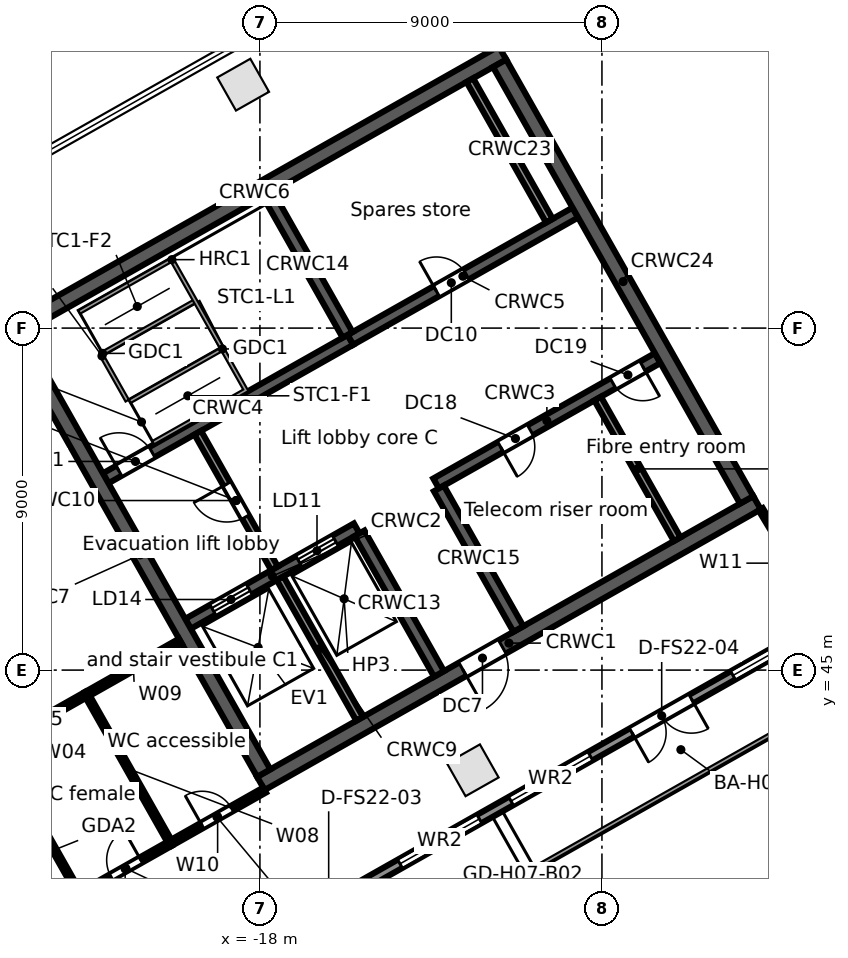
"""IFC4 building model, lengths in metres.
Left out: names, types, materials, properties, quantities, classifications, styles, units other than length and angle.
Written with IfcOpenShell. Run it as: python <this file> out.ifc"""

import sys

from ifc_helpers import new_model, si_unit, direction, frame, frame_2d, origin, origin_2d, place, context, subcontext, project, spatial, rectangle, extrude, element, fill, save


model = new_model("IFC4")
c1 = context("Model", 3, precision=1e-05, world=origin(), true_north=direction((0.0, 1.0)))
c2 = subcontext(c1, "Body", "Model", "MODEL_VIEW")
j1 = project(units=[si_unit("LENGTHUNIT", "METRE"), si_unit("PLANEANGLEUNIT", "RADIAN")], contexts=[c1])
p1 = place(None, origin())
s1 = spatial("IfcSite", under=j1, at=p1, CompositionType="ELEMENT")
p2 = place(p1, origin())
s2 = spatial("IfcBuilding", under=s1, at=p2, CompositionType="ELEMENT")
p3 = place(p2, frame((0.0, 0.0, 331.7)))
s3 = spatial("IfcBuildingStorey", under=s2, at=p3, CompositionType="ELEMENT", Elevation=331.7)
for number, where, z_axis, x_axis in (
    (1, (-18.441, 60.406, 0.0), (0.0, 0.0, 1.0), (-0.87, -0.492, 0.0)),
    (2, (-12.4, 42.363, 0.0), (0.0, 0.0, 1.0), (0.87, 0.492, 0.0)),
):
    element("IfcColumn", number, at=place(p3, frame(where, z_axis=z_axis, x_axis=x_axis)), inside=s3, PredefinedType="COLUMN", context=c2, shape_type="SweptSolid", body=[
        extrude(rectangle(XDim=1.0, YDim=1.0, at=origin_2d()), origin(), (0.0, 0.0, 1.0), 3.8),
    ])
p4 = place(p3, frame((-3.017, 46.293, 0.0), z_axis=(0.0, 0.0, 1.0), x_axis=(-0.870355474887, -0.492423950812, 0.0)))
e3 = element("IfcWall", 3, at=p4, inside=s3, PredefinedType="STANDARD", context=c2, shape_type="SweptSolid", body=[
    extrude(rectangle(XDim=40.34, YDim=0.25, at=frame_2d((20.17, 0.0))), origin(), (0.0, 0.0, 1.0), 3.52),
])
p5 = place(p4, frame((37.428, 0.0, 0.8)))
e4 = element("IfcOpeningElement", 4, at=p5, cuts=e3, PredefinedType="OPENING", context=c2, shape_type="SweptSolid", body=[
    extrude(rectangle(XDim=2.4, YDim=2.2, at=frame_2d((1.2, 1.1))), frame((0.0, 0.135, 0.0), z_axis=(0.0, -1.0, 0.0), x_axis=(1.0, 0.0, 0.0)), (0.0, 0.0, 1.0), 0.27),
])
p6 = place(p4, frame((34.372, 0.0, 0.0)))
e5 = element("IfcOpeningElement", 5, at=p6, cuts=e3, PredefinedType="OPENING", context=c2, shape_type="SweptSolid", body=[
    extrude(rectangle(XDim=1.8, YDim=2.4, at=frame_2d((0.9, 1.2))), frame((0.0, 0.135, 0.0), z_axis=(0.0, -1.0, 0.0), x_axis=(1.0, 0.0, 0.0)), (0.0, 0.0, 1.0), 0.27),
])
p7 = place(p4, frame((30.716, 0.0, 0.8)))
e6 = element("IfcOpeningElement", 6, at=p7, cuts=e3, PredefinedType="OPENING", context=c2, shape_type="SweptSolid", body=[
    extrude(rectangle(XDim=2.4, YDim=2.2, at=frame_2d((1.2, 1.1))), frame((0.0, 0.135, 0.0), z_axis=(0.0, -1.0, 0.0), x_axis=(1.0, 0.0, 0.0)), (0.0, 0.0, 1.0), 0.27),
])
p8 = place(p4, frame((27.36, 0.0, 0.8)))
e7 = element("IfcOpeningElement", 7, at=p8, cuts=e3, PredefinedType="OPENING", context=c2, shape_type="SweptSolid", body=[
    extrude(rectangle(XDim=2.4, YDim=2.2, at=frame_2d((1.2, 1.1))), frame((0.0, 0.135, 0.0), z_axis=(0.0, -1.0, 0.0), x_axis=(1.0, 0.0, 0.0)), (0.0, 0.0, 1.0), 0.27),
])
p9 = place(p4, frame((24.304, 0.0, 0.0)))
e8 = element("IfcOpeningElement", 8, at=p9, cuts=e3, PredefinedType="OPENING", context=c2, shape_type="SweptSolid", body=[
    extrude(rectangle(XDim=1.8, YDim=2.4, at=frame_2d((0.9, 1.2))), frame((0.0, 0.135, 0.0), z_axis=(0.0, -1.0, 0.0), x_axis=(1.0, 0.0, 0.0)), (0.0, 0.0, 1.0), 0.27),
])
p10 = place(p4, frame((20.648, 0.0, 0.8)))
e9 = element("IfcOpeningElement", 9, at=p10, cuts=e3, PredefinedType="OPENING", context=c2, shape_type="SweptSolid", body=[
    extrude(rectangle(XDim=2.4, YDim=2.2, at=frame_2d((1.2, 1.1))), frame((0.0, 0.135, 0.0), z_axis=(0.0, -1.0, 0.0), x_axis=(1.0, 0.0, 0.0)), (0.0, 0.0, 1.0), 0.27),
])
p11 = place(p4, frame((17.292, 0.0, 0.8)))
e10 = element("IfcOpeningElement", 10, at=p11, cuts=e3, PredefinedType="OPENING", context=c2, shape_type="SweptSolid", body=[
    extrude(rectangle(XDim=2.4, YDim=2.2, at=frame_2d((1.2, 1.1))), frame((0.0, 0.135, 0.0), z_axis=(0.0, -1.0, 0.0), x_axis=(1.0, 0.0, 0.0)), (0.0, 0.0, 1.0), 0.27),
])
p12 = place(p4, frame((14.236, 0.0, 0.0)))
e11 = element("IfcOpeningElement", 11, at=p12, cuts=e3, PredefinedType="OPENING", context=c2, shape_type="SweptSolid", body=[
    extrude(rectangle(XDim=1.8, YDim=2.4, at=frame_2d((0.9, 1.2))), frame((0.0, 0.135, 0.0), z_axis=(0.0, -1.0, 0.0), x_axis=(1.0, 0.0, 0.0)), (0.0, 0.0, 1.0), 0.27),
])
p13 = place(p4, frame((10.58, 0.0, 0.8)))
e12 = element("IfcOpeningElement", 12, at=p13, cuts=e3, PredefinedType="OPENING", context=c2, shape_type="SweptSolid", body=[
    extrude(rectangle(XDim=2.4, YDim=2.2, at=frame_2d((1.2, 1.1))), frame((0.0, 0.135, 0.0), z_axis=(0.0, -1.0, 0.0), x_axis=(1.0, 0.0, 0.0)), (0.0, 0.0, 1.0), 0.27),
])
p14 = place(p4, frame((7.224, 0.0, 0.8)))
e13 = element("IfcOpeningElement", 13, at=p14, cuts=e3, PredefinedType="OPENING", context=c2, shape_type="SweptSolid", body=[
    extrude(rectangle(XDim=2.4, YDim=2.2, at=frame_2d((1.2, 1.1))), frame((0.0, 0.135, 0.0), z_axis=(0.0, -1.0, 0.0), x_axis=(1.0, 0.0, 0.0)), (0.0, 0.0, 1.0), 0.27),
])
p15 = place(p4, frame((4.168, 0.0, 0.0)))
e14 = element("IfcOpeningElement", 14, at=p15, cuts=e3, PredefinedType="OPENING", context=c2, shape_type="SweptSolid", body=[
    extrude(rectangle(XDim=1.8, YDim=2.4, at=frame_2d((0.9, 1.2))), frame((0.0, 0.135, 0.0), z_axis=(0.0, -1.0, 0.0), x_axis=(1.0, 0.0, 0.0)), (0.0, 0.0, 1.0), 0.27),
])
p16 = place(p4, frame((0.512, 0.0, 0.8)))
e15 = element("IfcOpeningElement", 15, at=p16, cuts=e3, PredefinedType="OPENING", context=c2, shape_type="SweptSolid", body=[
    extrude(rectangle(XDim=2.4, YDim=2.2, at=frame_2d((1.2, 1.1))), frame((0.0, 0.135, 0.0), z_axis=(0.0, -1.0, 0.0), x_axis=(1.0, 0.0, 0.0)), (0.0, 0.0, 1.0), 0.27),
])
p17 = place(p3, frame((-17.975, 42.017, 0.0), z_axis=(0.0, 0.0, 1.0), x_axis=(0.87034965173, 0.492434243055, 0.0)))
e16 = element("IfcWall", 16, at=p17, inside=s3, PredefinedType="SOLIDWALL", context=c2, shape_type="SweptSolid", body=[
    extrude(rectangle(XDim=15.0, YDim=0.4, at=frame_2d((7.5, 0.0))), origin(), (0.0, 0.0, 1.0), 3.52),
])
p18 = place(p17, frame((6.1, 0.0, 0.0)))
e17 = element("IfcOpeningElement", 17, at=p18, cuts=e16, PredefinedType="OPENING", context=c2, shape_type="SweptSolid", body=[
    extrude(rectangle(XDim=1.2, YDim=2.1, at=frame_2d((0.6, 1.05))), frame((0.0, 0.21, 0.0), z_axis=(0.0, -1.0, 0.0), x_axis=(1.0, 0.0, 0.0)), (0.0, 0.0, 1.0), 0.42),
])
p19 = place(p3, frame((-19.892, 46.218, 0.0), z_axis=(0.0, 0.0, 1.0), x_axis=(0.870341639186, 0.492448404505, 0.0)))
e18 = element("IfcWall", 18, at=p19, inside=s3, PredefinedType="SOLIDWALL", context=c2, shape_type="SweptSolid", body=[
    extrude(rectangle(XDim=5.1, YDim=0.3, at=frame_2d((2.55, 0.0))), origin(), (0.0, 0.0, 1.0), 3.52),
])
p20 = place(p19, frame((0.75, 0.0, 0.0)))
e19 = element("IfcOpeningElement", 19, at=p20, cuts=e18, PredefinedType="OPENING", context=c2, shape_type="SweptSolid", body=[
    extrude(rectangle(XDim=1.1, YDim=2.1, at=frame_2d((0.55, 1.05))), frame((0.0, 0.16, 0.0), z_axis=(0.0, -1.0, 0.0), x_axis=(1.0, 0.0, 0.0)), (0.0, 0.0, 1.0), 0.32),
])
p21 = place(p19, frame((3.35, 0.0, 0.0)))
e20 = element("IfcOpeningElement", 20, at=p21, cuts=e18, PredefinedType="OPENING", context=c2, shape_type="SweptSolid", body=[
    extrude(rectangle(XDim=1.1, YDim=2.1, at=frame_2d((0.55, 1.05))), frame((0.0, 0.16, 0.0), z_axis=(0.0, -1.0, 0.0), x_axis=(1.0, 0.0, 0.0)), (0.0, 0.0, 1.0), 0.32),
])
p22 = place(p3, frame((-13.365, 49.911, 0.0), z_axis=(0.0, 0.0, 1.0), x_axis=(0.870347618718, 0.492437836272, 0.0)))
e21 = element("IfcWall", 21, at=p22, inside=s3, PredefinedType="SOLIDWALL", context=c2, shape_type="SweptSolid", body=[
    extrude(rectangle(XDim=6.7, YDim=0.3, at=frame_2d((3.35, 0.0))), origin(), (0.0, 0.0, 1.0), 3.52),
])
p23 = place(p22, frame((1.95, 0.0, 0.0)))
e22 = element("IfcOpeningElement", 22, at=p23, cuts=e21, PredefinedType="OPENING", context=c2, shape_type="SweptSolid", body=[
    extrude(rectangle(XDim=0.9, YDim=2.1, at=frame_2d((0.45, 1.05))), frame((0.0, 0.16, 0.0), z_axis=(0.0, -1.0, 0.0), x_axis=(1.0, 0.0, 0.0)), (0.0, 0.0, 1.0), 0.32),
])
p24 = place(p22, frame((5.35, 0.0, 0.0)))
e23 = element("IfcOpeningElement", 23, at=p24, cuts=e21, PredefinedType="OPENING", context=c2, shape_type="SweptSolid", body=[
    extrude(rectangle(XDim=0.9, YDim=2.1, at=frame_2d((0.45, 1.05))), frame((0.0, 0.16, 0.0), z_axis=(0.0, -1.0, 0.0), x_axis=(1.0, 0.0, 0.0)), (0.0, 0.0, 1.0), 0.32),
])
p25 = place(p3, frame((-22.059, 50.047, 0.0), z_axis=(0.0, 0.0, 1.0), x_axis=(0.87035077051, 0.49243226567, 0.0)))
e24 = element("IfcWall", 24, at=p25, inside=s3, PredefinedType="SOLIDWALL", context=c2, shape_type="SweptSolid", body=[
    extrude(rectangle(XDim=7.4, YDim=0.3, at=frame_2d((3.7, 0.0))), origin(), (0.0, 0.0, 1.0), 3.52),
])
p26 = place(p25, frame((0.4, 0.0, 0.0)))
e25 = element("IfcOpeningElement", 25, at=p26, cuts=e24, PredefinedType="OPENING", context=c2, shape_type="SweptSolid", body=[
    extrude(rectangle(XDim=1.0, YDim=2.1, at=frame_2d((0.5, 1.05))), frame((0.0, 0.16, 0.0), z_axis=(0.0, -1.0, 0.0), x_axis=(1.0, 0.0, 0.0)), (0.0, 0.0, 1.0), 0.32),
])
p27 = place(p3, frame((-15.618, 53.691, 0.0), z_axis=(0.0, 0.0, 1.0), x_axis=(0.870362830851, 0.492410948978, 0.0)))
e26 = element("IfcWall", 26, at=p27, inside=s3, PredefinedType="SOLIDWALL", context=c2, shape_type="SweptSolid", body=[
    extrude(rectangle(XDim=6.8, YDim=0.3, at=frame_2d((3.4, 0.0))), origin(), (0.0, 0.0, 1.0), 3.52),
])
p28 = place(p27, frame((2.6, 0.0, 0.0)))
e27 = element("IfcOpeningElement", 27, at=p28, cuts=e26, PredefinedType="OPENING", context=c2, shape_type="SweptSolid", body=[
    extrude(rectangle(XDim=0.9, YDim=2.1, at=frame_2d((0.45, 1.05))), frame((0.0, 0.16, 0.0), z_axis=(0.0, -1.0, 0.0), x_axis=(1.0, 0.0, 0.0)), (0.0, 0.0, 1.0), 0.32),
])
p29 = place(p3, frame((-24.672, 53.854, 0.0), z_axis=(0.0, 0.0, 1.0), x_axis=(0.870353598469, 0.492427267353, 0.0)))
e28 = element("IfcWall", 28, at=p29, inside=s3, PredefinedType="SOLIDWALL", context=c2, shape_type="SweptSolid", body=[
    extrude(rectangle(XDim=15.0, YDim=0.4, at=frame_2d((7.5, 0.0))), origin(), (0.0, 0.0, 1.0), 3.52),
])
p30 = place(p3, frame((-24.4, 53.779, 0.0), z_axis=(0.0, 0.0, 1.0), x_axis=(0.492421663121, -0.870356769198, 0.0)))
e29 = element("IfcWall", 29, at=p30, inside=s3, PredefinedType="SOLIDWALL", context=c2, shape_type="SweptSolid", body=[
    extrude(rectangle(XDim=13.2, YDim=0.4, at=frame_2d((6.6, 0.0))), origin(), (0.0, 0.0, 1.0), 3.52),
])
p31 = place(p3, frame((-17.469, 47.417, 0.0), z_axis=(0.0, 0.0, 1.0), x_axis=(0.492466057713, -0.870331650579, 0.0)))
e30 = element("IfcWall", 30, at=p31, inside=s3, PredefinedType="SOLIDWALL", context=c2, shape_type="SweptSolid", body=[
    extrude(rectangle(XDim=4.25, YDim=0.2, at=frame_2d((2.125, 0.0))), origin(), (0.0, 0.0, 1.0), 3.52),
])
p32 = place(p3, frame((-19.635, 51.246, 0.0), z_axis=(0.0, 0.0, 1.0), x_axis=(0.492408451753, -0.87036424366, 0.0)))
e31 = element("IfcWall", 31, at=p32, inside=s3, PredefinedType="PARTITIONING", context=c2, shape_type="SweptSolid", body=[
    extrude(rectangle(XDim=4.1, YDim=0.2, at=frame_2d((2.05, 0.0))), origin(), (0.0, 0.0, 1.0), 3.52),
])
p33 = place(p32, frame((1.55, 0.0, 0.0)))
e32 = element("IfcOpeningElement", 32, at=p33, cuts=e31, PredefinedType="OPENING", context=c2, shape_type="SweptSolid", body=[
    extrude(rectangle(XDim=1.0, YDim=2.1, at=frame_2d((0.5, 1.05))), frame((0.0, 0.11, 0.0), z_axis=(0.0, -1.0, 0.0), x_axis=(1.0, 0.0, 0.0)), (0.0, 0.0, 1.0), 0.22),
])
for number, where, z_axis, x_axis in (
    (33, (-15.379, 48.599, 0.0), (0.0, 0.0, 1.0), (0.492, -0.87, 0.0)),
    (34, (-17.785, 57.521, 0.0), (0.0, 0.0, 1.0), (0.492, -0.87, 0.0)),
):
    element("IfcWall", number, at=place(p3, frame(where, z_axis=z_axis, x_axis=x_axis)), inside=s3, PredefinedType="SOLIDWALL", context=c2, shape_type="SweptSolid", body=[
        extrude(rectangle(XDim=4.25, YDim=0.3, at=frame_2d((2.125, 0.0))), origin(), (0.0, 0.0, 1.0), 3.52),
    ])
p34 = place(p3, frame((-13.291, 49.781, 0.0), z_axis=(0.0, 0.0, 1.0), x_axis=(0.492397924348, -0.870370199454, 0.0)))
e35 = element("IfcWall", 35, at=p34, inside=s3, PredefinedType="SOLIDWALL", context=c2, shape_type="SweptSolid", body=[
    extrude(rectangle(XDim=4.25, YDim=0.3, at=frame_2d((2.125, 0.0))), origin(), (0.0, 0.0, 1.0), 3.52),
])
p35 = place(p3, frame((-9.113, 52.144, 0.0), z_axis=(0.0, 0.0, 1.0), x_axis=(0.492422543467, -0.870356271124, 0.0)))
e36 = element("IfcWall", 36, at=p35, inside=s3, PredefinedType="PARTITIONING", context=c2, shape_type="SweptSolid", body=[
    extrude(rectangle(XDim=4.25, YDim=0.2, at=frame_2d((2.125, 0.0))), origin(), (0.0, 0.0, 1.0), 3.52),
])
p36 = place(p3, frame((-12.476, 60.525, 0.0), z_axis=(0.0, 0.0, 1.0), x_axis=(0.492422543467, -0.870356271124, 0.0)))
e37 = element("IfcWall", 37, at=p36, inside=s3, PredefinedType="SOLIDWALL", context=c2, shape_type="SweptSolid", body=[
    extrude(rectangle(XDim=4.25, YDim=0.2, at=frame_2d((2.125, 0.0))), origin(), (0.0, 0.0, 1.0), 3.52),
])
p37 = place(p3, frame((-11.692, 60.968, 0.0), z_axis=(0.0, 0.0, 1.0), x_axis=(0.492421663121, -0.870356769198, 0.0)))
e38 = element("IfcWall", 38, at=p37, inside=s3, PredefinedType="SOLIDWALL", context=c2, shape_type="SweptSolid", body=[
    extrude(rectangle(XDim=13.2, YDim=0.4, at=frame_2d((6.6, 0.0))), origin(), (0.0, 0.0, 1.0), 3.52),
])
p38 = place(p3, frame((-24.959, 43.007, 0.0), z_axis=(0.0, 0.0, 1.0), x_axis=(0.492412939134, -0.87036170491, 0.0)))
e39 = element("IfcWall", 39, at=p38, inside=s3, PredefinedType="PARTITIONING", context=c2, shape_type="SweptSolid", body=[
    extrude(rectangle(XDim=4.5, YDim=0.125, at=frame_2d((2.25, 0.0))), origin(), (0.0, 0.0, 1.0), 3.52),
])
p39 = place(p3, frame((-24.959, 43.007, 0.0), z_axis=(0.0, 0.0, 1.0), x_axis=(0.870430549821, 0.492291232848, 0.0)))
e40 = element("IfcWall", 40, at=p39, inside=s3, PredefinedType="PARTITIONING", context=c2, shape_type="SweptSolid", body=[
    extrude(rectangle(XDim=2.75, YDim=0.15, at=frame_2d((1.375, 0.0))), origin(), (0.0, 0.0, 1.0), 3.52),
])
p40 = place(p3, frame((-22.743, 39.09, 0.0), z_axis=(0.0, 0.0, 1.0), x_axis=(0.870409035047, 0.492329271634, 0.0)))
e41 = element("IfcWall", 41, at=p40, inside=s3, PredefinedType="PARTITIONING", context=c2, shape_type="SweptSolid", body=[
    extrude(rectangle(XDim=2.75, YDim=0.15, at=frame_2d((1.375, 0.0))), origin(), (0.0, 0.0, 1.0), 3.52),
])
p41 = place(p40, frame((0.95, 0.0, 0.0)))
e42 = element("IfcOpeningElement", 42, at=p41, cuts=e41, PredefinedType="OPENING", context=c2, shape_type="SweptSolid", body=[
    extrude(rectangle(XDim=0.9, YDim=2.1, at=frame_2d((0.45, 1.05))), frame((0.0, 0.085, 0.0), z_axis=(0.0, -1.0, 0.0), x_axis=(1.0, 0.0, 0.0)), (0.0, 0.0, 1.0), 0.17),
])
p42 = place(p3, frame((-22.565, 44.361, 0.0), z_axis=(0.0, 0.0, 1.0), x_axis=(0.492371842706, -0.870384954207, 0.0)))
e43 = element("IfcWall", 43, at=p42, inside=s3, PredefinedType="PARTITIONING", context=c2, shape_type="SweptSolid", body=[
    extrude(rectangle(XDim=4.5, YDim=0.125, at=frame_2d((2.25, 0.0))), origin(), (0.0, 0.0, 1.0), 3.52),
])
p43 = place(p3, frame((-22.565, 44.361, 0.0), z_axis=(0.0, 0.0, 1.0), x_axis=(0.87029856663, 0.492524522152, 0.0)))
e44 = element("IfcWall", 44, at=p43, inside=s3, PredefinedType="PARTITIONING", context=c2, shape_type="SweptSolid", body=[
    extrude(rectangle(XDim=2.84, YDim=0.15, at=frame_2d((1.42, 0.0))), origin(), (0.0, 0.0, 1.0), 3.52),
])
p44 = place(p3, frame((-20.349, 40.444, 0.0), z_axis=(0.0, 0.0, 1.0), x_axis=(0.87031941539, 0.492487680247, 0.0)))
e45 = element("IfcWall", 45, at=p44, inside=s3, PredefinedType="PARTITIONING", context=c2, shape_type="SweptSolid", body=[
    extrude(rectangle(XDim=2.841, YDim=0.15, at=frame_2d((1.42, 0.0))), origin(), (0.0, 0.0, 1.0), 3.52),
])
p45 = place(p44, frame((0.95, 0.0, 0.0)))
e46 = element("IfcOpeningElement", 46, at=p45, cuts=e45, PredefinedType="OPENING", context=c2, shape_type="SweptSolid", body=[
    extrude(rectangle(XDim=0.9, YDim=2.1, at=frame_2d((0.45, 1.05))), frame((0.0, 0.085, 0.0), z_axis=(0.0, -1.0, 0.0), x_axis=(1.0, 0.0, 0.0)), (0.0, 0.0, 1.0), 0.17),
])
p46 = place(p3, frame((-4.821, 49.23, 0.0), z_axis=(0.0, 0.0, 1.0), x_axis=(0.515006587647, -0.857186219371, 0.0)))
e47 = element("IfcWall", 47, at=p46, inside=s3, PredefinedType="PARTITIONING", context=c2, shape_type="SweptSolid", body=[
    extrude(rectangle(XDim=3.303, YDim=0.125, at=frame_2d((1.651, 0.0))), origin(), (0.0, 0.0, 1.0), 2.8),
])
p47 = place(p46, frame((1.2, 0.0, 0.0)))
e48 = element("IfcOpeningElement", 48, at=p47, cuts=e47, PredefinedType="OPENING", context=c2, shape_type="SweptSolid", body=[
    extrude(rectangle(XDim=1.8, YDim=2.1, at=frame_2d((0.9, 1.05))), frame((0.0, 0.073, 0.0), z_axis=(0.0, -1.0, 0.0), x_axis=(1.0, 0.0, 0.0)), (0.0, 0.0, 1.0), 0.145),
])
p48 = place(p13, origin())
e49 = element("IfcWindow", 49, at=p48, inside=s3, PartitioningType="SINGLE_PANEL", PredefinedType="WINDOW", context=c2, shape_type="SweptSolid", body=[
    extrude(rectangle(XDim=2.4, YDim=2.2, at=frame_2d((1.2, 1.1))), frame((0.0, 0.03, 0.0), z_axis=(0.0, -1.0, 0.0), x_axis=(1.0, 0.0, 0.0)), (0.0, 0.0, 1.0), 0.06),
])
fill(e12, e49)
p49 = place(p14, origin())
e50 = element("IfcWindow", 50, at=p49, inside=s3, PartitioningType="SINGLE_PANEL", PredefinedType="WINDOW", context=c2, shape_type="SweptSolid", body=[
    extrude(rectangle(XDim=2.4, YDim=2.2, at=frame_2d((1.2, 1.1))), frame((0.0, 0.03, 0.0), z_axis=(0.0, -1.0, 0.0), x_axis=(1.0, 0.0, 0.0)), (0.0, 0.0, 1.0), 0.06),
])
fill(e13, e50)
p50 = place(p15, origin())
e51 = element("IfcDoor", 51, at=p50, inside=s3, OperationType="DOUBLE_DOOR_SINGLE_SWING", PredefinedType="DOOR", context=c2, shape_type="SweptSolid", body=[
    extrude(rectangle(XDim=1.8, YDim=2.4, at=frame_2d((0.9, 1.2))), frame((0.0, 0.025, 0.0), z_axis=(0.0, -1.0, 0.0), x_axis=(1.0, 0.0, 0.0)), (0.0, 0.0, 1.0), 0.05),
])
fill(e14, e51)
p51 = place(p16, origin())
e52 = element("IfcWindow", 52, at=p51, inside=s3, PartitioningType="SINGLE_PANEL", PredefinedType="WINDOW", context=c2, shape_type="SweptSolid", body=[
    extrude(rectangle(XDim=2.4, YDim=2.2, at=frame_2d((1.2, 1.1))), frame((0.0, 0.03, 0.0), z_axis=(0.0, -1.0, 0.0), x_axis=(1.0, 0.0, 0.0)), (0.0, 0.0, 1.0), 0.06),
])
fill(e15, e52)
p52 = place(p20, origin())
e53 = element("IfcDoor", 53, at=p52, inside=s3, OperationType="DOUBLE_DOOR_SLIDING", PredefinedType="DOOR", context=c2, shape_type="SweptSolid", body=[
    extrude(rectangle(XDim=1.1, YDim=2.1, at=frame_2d((0.55, 1.05))), frame((0.0, 0.025, 0.0), z_axis=(0.0, -1.0, 0.0), x_axis=(1.0, 0.0, 0.0)), (0.0, 0.0, 1.0), 0.05),
])
fill(e19, e53)
p53 = place(p21, origin())
e54 = element("IfcDoor", 54, at=p53, inside=s3, OperationType="DOUBLE_DOOR_SLIDING", PredefinedType="DOOR", context=c2, shape_type="SweptSolid", body=[
    extrude(rectangle(XDim=1.1, YDim=2.1, at=frame_2d((0.55, 1.05))), frame((0.0, 0.025, 0.0), z_axis=(0.0, -1.0, 0.0), x_axis=(1.0, 0.0, 0.0)), (0.0, 0.0, 1.0), 0.05),
])
fill(e20, e54)
p54 = place(p26, origin())
e55 = element("IfcDoor", 55, at=p54, inside=s3, OperationType="SINGLE_SWING_LEFT", PredefinedType="DOOR", context=c2, shape_type="SweptSolid", body=[
    extrude(rectangle(XDim=1.0, YDim=2.1, at=frame_2d((0.5, 1.05))), frame((0.0, 0.025, 0.0), z_axis=(0.0, -1.0, 0.0), x_axis=(1.0, 0.0, 0.0)), (0.0, 0.0, 1.0), 0.05),
])
fill(e25, e55)
p55 = place(p33, frame((1.0, 0.0, 0.0), z_axis=(0.0, 0.0, 1.0), x_axis=(-1.0, 0.0, 0.0)))
e56 = element("IfcDoor", 56, at=p55, inside=s3, OperationType="SINGLE_SWING_RIGHT", PredefinedType="DOOR", context=c2, shape_type="SweptSolid", body=[
    extrude(rectangle(XDim=1.0, YDim=2.1, at=frame_2d((0.5, 1.05))), frame((0.0, 0.025, 0.0), z_axis=(0.0, -1.0, 0.0), x_axis=(1.0, 0.0, 0.0)), (0.0, 0.0, 1.0), 0.05),
])
fill(e32, e56)
p56 = place(p18, frame((1.2, 0.0, 0.0), z_axis=(0.0, 0.0, 1.0), x_axis=(-1.0, 0.0, 0.0)))
e57 = element("IfcDoor", 57, at=p56, inside=s3, OperationType="SINGLE_SWING_RIGHT", PredefinedType="DOOR", context=c2, shape_type="SweptSolid", body=[
    extrude(rectangle(XDim=1.2, YDim=2.1, at=frame_2d((0.6, 1.05))), frame((0.0, 0.025, 0.0), z_axis=(0.0, -1.0, 0.0), x_axis=(1.0, 0.0, 0.0)), (0.0, 0.0, 1.0), 0.05),
])
fill(e17, e57)
p57 = place(p28, origin())
e58 = element("IfcDoor", 58, at=p57, inside=s3, OperationType="SINGLE_SWING_LEFT", PredefinedType="DOOR", context=c2, shape_type="SweptSolid", body=[
    extrude(rectangle(XDim=0.9, YDim=2.1, at=frame_2d((0.45, 1.05))), frame((0.0, 0.025, 0.0), z_axis=(0.0, -1.0, 0.0), x_axis=(1.0, 0.0, 0.0)), (0.0, 0.0, 1.0), 0.05),
])
fill(e27, e58)
p58 = place(p23, frame((0.9, 0.0, 0.0), z_axis=(0.0, 0.0, 1.0), x_axis=(-1.0, 0.0, 0.0)))
e59 = element("IfcDoor", 59, at=p58, inside=s3, OperationType="SINGLE_SWING_RIGHT", PredefinedType="DOOR", context=c2, shape_type="SweptSolid", body=[
    extrude(rectangle(XDim=0.9, YDim=2.1, at=frame_2d((0.45, 1.05))), frame((0.0, 0.025, 0.0), z_axis=(0.0, -1.0, 0.0), x_axis=(1.0, 0.0, 0.0)), (0.0, 0.0, 1.0), 0.05),
])
fill(e22, e59)
p59 = place(p24, frame((0.9, 0.0, 0.0), z_axis=(0.0, 0.0, 1.0), x_axis=(-1.0, 0.0, 0.0)))
e60 = element("IfcDoor", 60, at=p59, inside=s3, OperationType="SINGLE_SWING_LEFT", PredefinedType="DOOR", context=c2, shape_type="SweptSolid", body=[
    extrude(rectangle(XDim=0.9, YDim=2.1, at=frame_2d((0.45, 1.05))), frame((0.0, 0.025, 0.0), z_axis=(0.0, -1.0, 0.0), x_axis=(1.0, 0.0, 0.0)), (0.0, 0.0, 1.0), 0.05),
])
fill(e23, e60)
p60 = place(p41, origin())
e61 = element("IfcDoor", 61, at=p60, inside=s3, OperationType="SINGLE_SWING_RIGHT", PredefinedType="DOOR", context=c2, shape_type="SweptSolid", body=[
    extrude(rectangle(XDim=0.9, YDim=2.1, at=frame_2d((0.45, 1.05))), frame((0.0, 0.025, 0.0), z_axis=(0.0, -1.0, 0.0), x_axis=(1.0, 0.0, 0.0)), (0.0, 0.0, 1.0), 0.05),
])
fill(e42, e61)
p61 = place(p45, origin())
e62 = element("IfcDoor", 62, at=p61, inside=s3, OperationType="SINGLE_SWING_LEFT", PredefinedType="DOOR", context=c2, shape_type="SweptSolid", body=[
    extrude(rectangle(XDim=0.9, YDim=2.1, at=frame_2d((0.45, 1.05))), frame((0.0, 0.025, 0.0), z_axis=(0.0, -1.0, 0.0), x_axis=(1.0, 0.0, 0.0)), (0.0, 0.0, 1.0), 0.05),
])
fill(e46, e62)
save(model, sys.argv[1])
